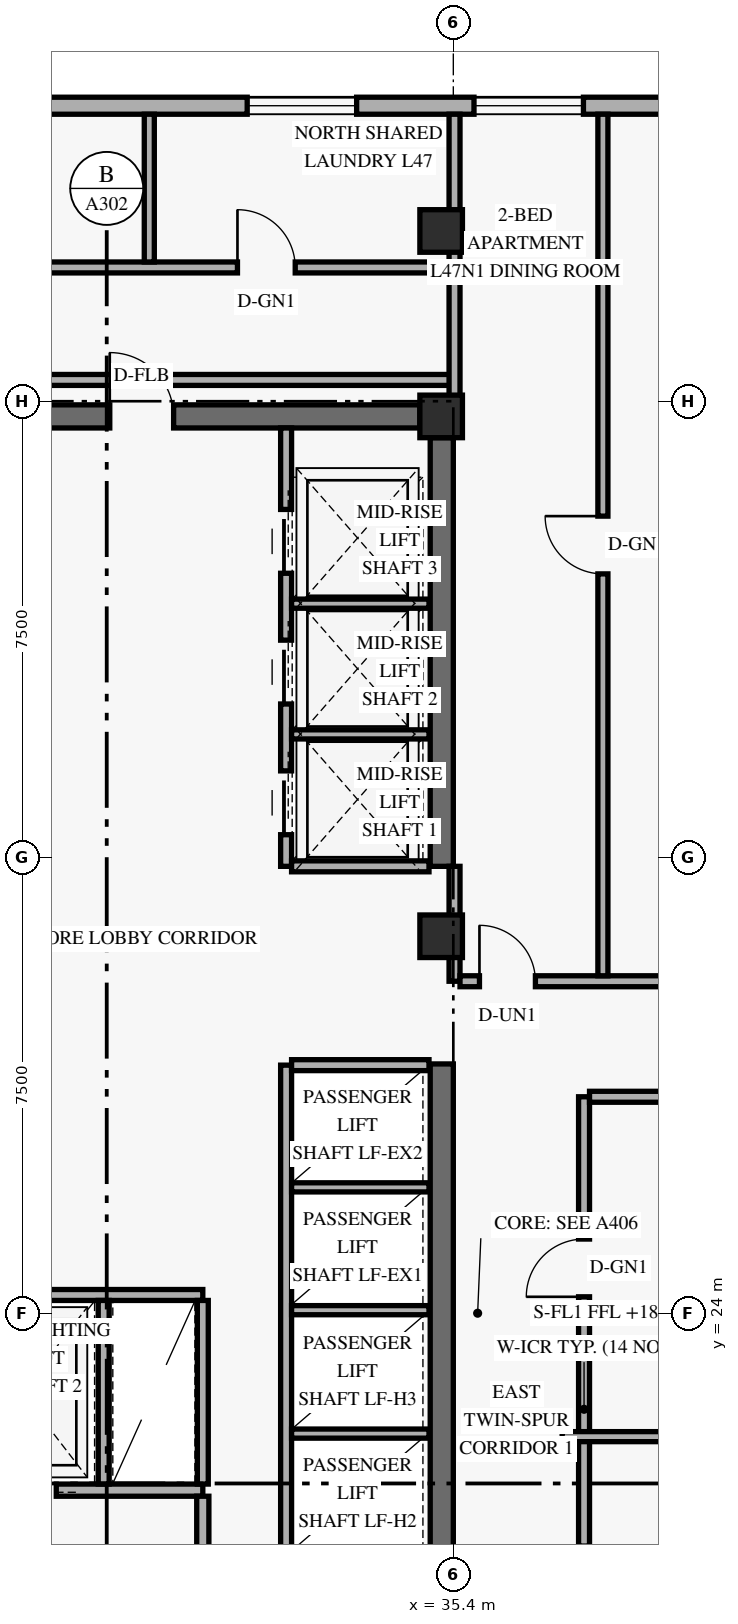
"""IFC4 building model, lengths in metres.
Left out: names, types, materials, properties, quantities, classifications, styles, units other than length and angle.
Written with IfcOpenShell. Run it as: python <this file> out.ifc"""

import sys

from ifc_helpers import new_model, si_unit, direction, frame, frame_2d, origin, origin_2d, place, context, subcontext, project, spatial, rectangle, extrude, element, fill, save


model = new_model("IFC4")
c1 = context("Model", 3, precision=1e-05, world=origin(), true_north=direction((0.0, 1.0)))
c2 = subcontext(c1, "Body", "Model", "MODEL_VIEW")
j1 = project(units=[si_unit("LENGTHUNIT", "METRE"), si_unit("PLANEANGLEUNIT", "RADIAN")], contexts=[c1])
p1 = place(None, origin())
s1 = spatial("IfcSite", under=j1, at=p1, CompositionType="ELEMENT")
p2 = place(p1, origin())
s2 = spatial("IfcBuilding", under=s1, at=p2, CompositionType="ELEMENT")
p3 = place(p2, frame((0.0, 0.0, 181.2)))
s3 = spatial("IfcBuildingStorey", under=s2, at=p3, CompositionType="ELEMENT", Elevation=181.2)
p4 = place(p3, frame((35.21, 17.9, 0.0), z_axis=(0.0, 0.0, 1.0), x_axis=(0.0, 1.0, 0.0)))
e1 = element("IfcWall", 1, at=p4, inside=s3, PredefinedType="SHEAR", context=c2, shape_type="SweptSolid", body=[
    extrude(rectangle(XDim=10.2, YDim=0.38, at=frame_2d((5.1, 0.0))), origin(), (0.0, 0.0, 1.0), 2.748),
])
p5 = place(p3, frame((35.21, 31.35, 0.0), z_axis=(0.0, 0.0, 1.0), x_axis=(0.0, 1.0, 0.0)))
e2 = element("IfcWall", 2, at=p5, inside=s3, PredefinedType="SHEAR", context=c2, shape_type="SweptSolid", body=[
    extrude(rectangle(XDim=7.05, YDim=0.38, at=frame_2d((3.525, 0.0))), origin(), (0.0, 0.0, 1.0), 2.748),
])
p6 = place(p3, frame((24.55, 38.75, 0.0), z_axis=(0.0, 0.0, 1.0), x_axis=(1.0, 0.0, 0.0)))
e3 = element("IfcWall", 3, at=p6, inside=s3, PredefinedType="SHEAR", context=c2, shape_type="SweptSolid", body=[
    extrude(rectangle(XDim=10.3, YDim=0.38, at=frame_2d((5.15, 0.0))), origin(), (0.0, 0.0, 1.0), 3.36),
])
p7 = place(p6, frame((5.2, 0.0, 0.0)))
e4 = element("IfcOpeningElement", 4, at=p7, cuts=e3, PredefinedType="OPENING", context=c2, shape_type="SweptSolid", body=[
    extrude(rectangle(XDim=1.05, YDim=2.15, at=frame_2d((0.525, 1.075))), frame((0.0, 0.2, 0.0), z_axis=(0.0, -1.0, 0.0), x_axis=(1.0, 0.0, 0.0)), (0.0, 0.0, 1.0), 0.4),
])
for number, where, z_axis, x_axis in (
    (5, (35.2, 30.2, 0.0), (0.0, 0.0, 1.0), (1.0, 0.0, 0.0)),
    (6, (35.2, 38.75, 0.0), (0.0, 0.0, 1.0), (1.0, 0.0, 0.0)),
    (7, (35.2, 41.8, 0.0), (0.0, 0.0, 1.0), (1.0, 0.0, 0.0)),
):
    element("IfcColumn", number, at=place(p3, frame(where, z_axis=z_axis, x_axis=x_axis)), inside=s3, PredefinedType="COLUMN", context=c2, shape_type="SweptSolid", body=[
        extrude(rectangle(XDim=0.7, YDim=0.7, at=origin_2d()), origin(), (0.0, 0.0, 1.0), 3.6),
    ])
p8 = place(p3, frame((54.98, 43.86, 0.0), z_axis=(0.0, 0.0, 1.0), x_axis=(-1.0, 0.0, 0.0)))
e8 = element("IfcWall", 8, at=p8, inside=s3, PredefinedType="SOLIDWALL", context=c2, shape_type="SweptSolid", body=[
    extrude(rectangle(XDim=33.76, YDim=0.28, at=frame_2d((16.88, 0.0))), origin(), (0.0, 0.0, 1.0), 3.36),
])
p9 = place(p8, frame((28.055, 0.0, 0.85)))
e9 = element("IfcOpeningElement", 9, at=p9, cuts=e8, PredefinedType="OPENING", context=c2, shape_type="SweptSolid", body=[
    extrude(rectangle(XDim=1.8, YDim=1.6, at=frame_2d((0.9, 0.8))), frame((0.0, 0.15, 0.0), z_axis=(0.0, -1.0, 0.0), x_axis=(1.0, 0.0, 0.0)), (0.0, 0.0, 1.0), 0.3),
])
p10 = place(p8, frame((21.17, 0.0, 0.85)))
e10 = element("IfcOpeningElement", 10, at=p10, cuts=e8, PredefinedType="OPENING", context=c2, shape_type="SweptSolid", body=[
    extrude(rectangle(XDim=1.8, YDim=1.6, at=frame_2d((0.9, 0.8))), frame((0.0, 0.15, 0.0), z_axis=(0.0, -1.0, 0.0), x_axis=(1.0, 0.0, 0.0)), (0.0, 0.0, 1.0), 0.3),
])
p11 = place(p8, frame((17.44, 0.0, 0.85)))
e11 = element("IfcOpeningElement", 11, at=p11, cuts=e8, PredefinedType="OPENING", context=c2, shape_type="SweptSolid", body=[
    extrude(rectangle(XDim=1.8, YDim=1.6, at=frame_2d((0.9, 0.8))), frame((0.0, 0.15, 0.0), z_axis=(0.0, -1.0, 0.0), x_axis=(1.0, 0.0, 0.0)), (0.0, 0.0, 1.0), 0.3),
])
p12 = place(p8, frame((13.32, 0.0, 0.85)))
e12 = element("IfcOpeningElement", 12, at=p12, cuts=e8, PredefinedType="OPENING", context=c2, shape_type="SweptSolid", body=[
    extrude(rectangle(XDim=1.8, YDim=1.6, at=frame_2d((0.9, 0.8))), frame((0.0, 0.15, 0.0), z_axis=(0.0, -1.0, 0.0), x_axis=(1.0, 0.0, 0.0)), (0.0, 0.0, 1.0), 0.3),
])
p13 = place(p8, frame((8.35, 0.0, 0.85)))
e13 = element("IfcOpeningElement", 13, at=p13, cuts=e8, PredefinedType="OPENING", context=c2, shape_type="SweptSolid", body=[
    extrude(rectangle(XDim=1.8, YDim=1.6, at=frame_2d((0.9, 0.8))), frame((0.0, 0.15, 0.0), z_axis=(0.0, -1.0, 0.0), x_axis=(1.0, 0.0, 0.0)), (0.0, 0.0, 1.0), 0.3),
])
p14 = place(p8, frame((5.68, 0.0, 0.85)))
e14 = element("IfcOpeningElement", 14, at=p14, cuts=e8, PredefinedType="OPENING", context=c2, shape_type="SweptSolid", body=[
    extrude(rectangle(XDim=1.2, YDim=1.5, at=frame_2d((0.6, 0.75))), frame((0.0, 0.15, 0.0), z_axis=(0.0, -1.0, 0.0), x_axis=(1.0, 0.0, 0.0)), (0.0, 0.0, 1.0), 0.3),
])
p15 = place(p8, frame((1.79, 0.0, 0.85)))
e15 = element("IfcOpeningElement", 15, at=p15, cuts=e8, PredefinedType="OPENING", context=c2, shape_type="SweptSolid", body=[
    extrude(rectangle(XDim=1.8, YDim=1.6, at=frame_2d((0.9, 0.8))), frame((0.0, 0.15, 0.0), z_axis=(0.0, -1.0, 0.0), x_axis=(1.0, 0.0, 0.0)), (0.0, 0.0, 1.0), 0.3),
])
p16 = place(p3, frame((24.45, 21.09, 0.0), z_axis=(0.0, 0.0, 1.0), x_axis=(1.0, 0.0, 0.0)))
e16 = element("IfcWall", 16, at=p16, inside=s3, PredefinedType="STANDARD", context=c2, shape_type="SweptSolid", body=[
    extrude(rectangle(XDim=6.83, YDim=0.2, at=frame_2d((3.415, 0.0))), origin(), (0.0, 0.0, 1.0), 3.36),
])
p17 = place(p16, frame((0.72, 0.0, 0.0)))
e17 = element("IfcOpeningElement", 17, at=p17, cuts=e16, PredefinedType="OPENING", context=c2, shape_type="SweptSolid", body=[
    extrude(rectangle(XDim=1.1, YDim=2.2, at=frame_2d((0.55, 1.1))), frame((0.0, 0.11, 0.0), z_axis=(0.0, -1.0, 0.0), x_axis=(1.0, 0.0, 0.0)), (0.0, 0.0, 1.0), 0.22),
])
p18 = place(p16, frame((3.32, 0.0, 0.0)))
e18 = element("IfcOpeningElement", 18, at=p18, cuts=e16, PredefinedType="OPENING", context=c2, shape_type="SweptSolid", body=[
    extrude(rectangle(XDim=1.1, YDim=2.2, at=frame_2d((0.55, 1.1))), frame((0.0, 0.11, 0.0), z_axis=(0.0, -1.0, 0.0), x_axis=(1.0, 0.0, 0.0)), (0.0, 0.0, 1.0), 0.22),
])
p19 = place(p3, frame((31.28, 17.07, 0.0), z_axis=(0.0, 0.0, 1.0), x_axis=(0.0, 1.0, 0.0)))
e19 = element("IfcWall", 19, at=p19, inside=s3, PredefinedType="STANDARD", context=c2, shape_type="SweptSolid", body=[
    extrude(rectangle(XDim=3.92, YDim=0.2, at=frame_2d((1.96, 0.0))), origin(), (0.0, 0.0, 1.0), 2.73),
])
p20 = place(p19, frame((1.35, 0.0, 0.0)))
e20 = element("IfcOpeningElement", 20, at=p20, cuts=e19, PredefinedType="OPENING", context=c2, shape_type="SweptSolid", body=[
    extrude(rectangle(XDim=1.2, YDim=2.15, at=frame_2d((0.6, 1.075))), frame((0.0, 0.11, 0.0), z_axis=(0.0, -1.0, 0.0), x_axis=(1.0, 0.0, 0.0)), (0.0, 0.0, 1.0), 0.22),
])
p21 = place(p3, frame((24.45, 24.3, 0.0), z_axis=(0.0, 0.0, 1.0), x_axis=(1.0, 0.0, 0.0)))
e21 = element("IfcWall", 21, at=p21, inside=s3, PredefinedType="STANDARD", context=c2, shape_type="SweptSolid", body=[
    extrude(rectangle(XDim=6.83, YDim=0.18, at=frame_2d((3.415, 0.0))), origin(), (0.0, 0.0, 1.0), 3.36),
])
for number, where, z_axis, x_axis in (
    (22, (29.65, 21.19, 0.0), (0.0, 0.0, 1.0), (0.0, 1.0, 0.0)),
    (23, (31.28, 21.19, 0.0), (0.0, 0.0, 1.0), (0.0, 1.0, 0.0)),
):
    element("IfcWall", number, at=place(p3, frame(where, z_axis=z_axis, x_axis=x_axis)), inside=s3, PredefinedType="STANDARD", context=c2, shape_type="SweptSolid", body=[
        extrude(rectangle(XDim=3.02, YDim=0.18, at=frame_2d((1.51, 0.0))), origin(), (0.0, 0.0, 1.0), 3.36),
    ])
p22 = place(p3, frame((32.65, 18.02, 0.0), z_axis=(0.0, 0.0, 1.0), x_axis=(0.0, 1.0, 0.0)))
e24 = element("IfcWall", 24, at=p22, inside=s3, PredefinedType="STANDARD", context=c2, shape_type="SweptSolid", body=[
    extrude(rectangle(XDim=10.06, YDim=0.18, at=frame_2d((5.03, 0.0))), origin(), (0.0, 0.0, 1.0), 3.36),
])
p23 = place(p3, frame((32.74, 28.08, 0.0), z_axis=(0.0, 0.0, 1.0), x_axis=(1.0, 0.0, 0.0)))
e25 = element("IfcWall", 25, at=p23, inside=s3, PredefinedType="STANDARD", context=c2, shape_type="SweptSolid", body=[
    extrude(rectangle(XDim=2.26, YDim=0.18, at=frame_2d((1.13, 0.0))), origin(), (0.0, 0.0, 1.0), 3.36),
])
for number, where, z_axis, x_axis in (
    (26, (32.74, 22.02, 0.0), (0.0, 0.0, 1.0), (1.0, 0.0, 0.0)),
    (27, (32.74, 24.05, 0.0), (0.0, 0.0, 1.0), (1.0, 0.0, 0.0)),
    (28, (32.74, 26.07, 0.0), (0.0, 0.0, 1.0), (1.0, 0.0, 0.0)),
):
    element("IfcWall", number, at=place(p3, frame(where, z_axis=z_axis, x_axis=x_axis)), inside=s3, PredefinedType="STANDARD", context=c2, shape_type="SweptSolid", body=[
        extrude(rectangle(XDim=2.26, YDim=0.15, at=frame_2d((1.13, 0.0))), origin(), (0.0, 0.0, 1.0), 3.36),
    ])
p24 = place(p3, frame((32.65, 31.35, 0.0), z_axis=(0.0, 0.0, 1.0), x_axis=(0.0, 1.0, 0.0)))
e29 = element("IfcWall", 29, at=p24, inside=s3, PredefinedType="STANDARD", context=c2, shape_type="SweptSolid", body=[
    extrude(rectangle(XDim=7.21, YDim=0.18, at=frame_2d((3.605, 0.0))), origin(), (0.0, 0.0, 1.0), 3.36),
])
p25 = place(p24, frame((0.52, 0.0, 0.0)))
e30 = element("IfcOpeningElement", 30, at=p25, cuts=e29, PredefinedType="OPENING", context=c2, shape_type="SweptSolid", body=[
    extrude(rectangle(XDim=1.05, YDim=2.2, at=frame_2d((0.525, 1.1))), frame((0.0, 0.1, 0.0), z_axis=(0.0, -1.0, 0.0), x_axis=(1.0, 0.0, 0.0)), (0.0, 0.0, 1.0), 0.2),
])
p26 = place(p24, frame((2.67, 0.0, 0.0)))
e31 = element("IfcOpeningElement", 31, at=p26, cuts=e29, PredefinedType="OPENING", context=c2, shape_type="SweptSolid", body=[
    extrude(rectangle(XDim=1.05, YDim=2.2, at=frame_2d((0.525, 1.1))), frame((0.0, 0.1, 0.0), z_axis=(0.0, -1.0, 0.0), x_axis=(1.0, 0.0, 0.0)), (0.0, 0.0, 1.0), 0.2),
])
p27 = place(p24, frame((4.82, 0.0, 0.0)))
e32 = element("IfcOpeningElement", 32, at=p27, cuts=e29, PredefinedType="OPENING", context=c2, shape_type="SweptSolid", body=[
    extrude(rectangle(XDim=1.05, YDim=2.2, at=frame_2d((0.525, 1.1))), frame((0.0, 0.1, 0.0), z_axis=(0.0, -1.0, 0.0), x_axis=(1.0, 0.0, 0.0)), (0.0, 0.0, 1.0), 0.2),
])
p28 = place(p3, frame((32.74, 31.35, 0.0), z_axis=(0.0, 0.0, 1.0), x_axis=(1.0, 0.0, 0.0)))
e33 = element("IfcWall", 33, at=p28, inside=s3, PredefinedType="STANDARD", context=c2, shape_type="SweptSolid", body=[
    extrude(rectangle(XDim=2.26, YDim=0.18, at=frame_2d((1.13, 0.0))), origin(), (0.0, 0.0, 1.0), 3.36),
])
for number, where, z_axis, x_axis in (
    (34, (32.74, 33.52, 0.0), (0.0, 0.0, 1.0), (1.0, 0.0, 0.0)),
    (35, (32.74, 35.67, 0.0), (0.0, 0.0, 1.0), (1.0, 0.0, 0.0)),
):
    element("IfcWall", number, at=place(p3, frame(where, z_axis=z_axis, x_axis=x_axis)), inside=s3, PredefinedType="STANDARD", context=c2, shape_type="SweptSolid", body=[
        extrude(rectangle(XDim=2.26, YDim=0.15, at=frame_2d((1.13, 0.0))), origin(), (0.0, 0.0, 1.0), 3.36),
    ])
p29 = place(p3, frame((37.55, 17.28, 0.0), z_axis=(0.0, 0.0, 1.0), x_axis=(0.0, 1.0, 0.0)))
e36 = element("IfcWall", 36, at=p29, inside=s3, PredefinedType="STANDARD", context=c2, shape_type="SweptSolid", body=[
    extrude(rectangle(XDim=10.28, YDim=0.18, at=frame_2d((5.14, 0.0))), origin(), (0.0, 0.0, 1.0), 2.73),
])
p30 = place(p29, frame((1.94, 0.0, 0.0)))
e37 = element("IfcOpeningElement", 37, at=p30, cuts=e36, PredefinedType="OPENING", context=c2, shape_type="SweptSolid", body=[
    extrude(rectangle(XDim=0.95, YDim=2.15, at=frame_2d((0.475, 1.075))), frame((0.0, 0.1, 0.0), z_axis=(0.0, -1.0, 0.0), x_axis=(1.0, 0.0, 0.0)), (0.0, 0.0, 1.0), 0.2),
])
p31 = place(p29, frame((6.99, 0.0, 0.0)))
e38 = element("IfcOpeningElement", 38, at=p31, cuts=e36, PredefinedType="OPENING", context=c2, shape_type="SweptSolid", body=[
    extrude(rectangle(XDim=0.95, YDim=2.15, at=frame_2d((0.475, 1.075))), frame((0.0, 0.1, 0.0), z_axis=(0.0, -1.0, 0.0), x_axis=(1.0, 0.0, 0.0)), (0.0, 0.0, 1.0), 0.2),
])
p32 = place(p3, frame((37.64, 27.56, 0.0), z_axis=(0.0, 0.0, 1.0), x_axis=(1.0, 0.0, 0.0)))
e39 = element("IfcWall", 39, at=p32, inside=s3, PredefinedType="STANDARD", context=c2, shape_type="SweptSolid", body=[
    extrude(rectangle(XDim=10.16, YDim=0.18, at=frame_2d((5.08, 0.0))), origin(), (0.0, 0.0, 1.0), 2.73),
])
p33 = place(p3, frame((35.42, 29.46, 0.0), z_axis=(0.0, 0.0, 1.0), x_axis=(0.0, 1.0, 0.0)))
e40 = element("IfcWall", 40, at=p33, inside=s3, PredefinedType="STANDARD", context=c2, shape_type="SweptSolid", body=[
    extrude(rectangle(XDim=1.89, YDim=0.18, at=frame_2d((0.945, 0.0))), origin(), (0.0, 0.0, 1.0), 2.73),
])
p34 = place(p3, frame((35.51, 29.46, 0.0), z_axis=(0.0, 0.0, 1.0), x_axis=(1.0, 0.0, 0.0)))
e41 = element("IfcWall", 41, at=p34, inside=s3, PredefinedType="STANDARD", context=c2, shape_type="SweptSolid", body=[
    extrude(rectangle(XDim=12.29, YDim=0.18, at=frame_2d((6.145, 0.0))), origin(), (0.0, 0.0, 1.0), 2.73),
])
p35 = place(p34, frame((0.32, 0.0, 0.0)))
e42 = element("IfcOpeningElement", 42, at=p35, cuts=e41, PredefinedType="OPENING", context=c2, shape_type="SweptSolid", body=[
    extrude(rectangle(XDim=0.92, YDim=2.15, at=frame_2d((0.46, 1.075))), frame((0.0, 0.1, 0.0), z_axis=(0.0, -1.0, 0.0), x_axis=(1.0, 0.0, 0.0)), (0.0, 0.0, 1.0), 0.2),
])
p36 = place(p3, frame((21.74, 41.2, 0.0), z_axis=(0.0, 0.0, 1.0), x_axis=(1.0, 0.0, 0.0)))
e43 = element("IfcWall", 43, at=p36, inside=s3, PredefinedType="STANDARD", context=c2, shape_type="SweptSolid", body=[
    extrude(rectangle(XDim=13.68, YDim=0.18, at=frame_2d((6.84, 0.0))), origin(), (0.0, 0.0, 1.0), 2.73),
])
p37 = place(p36, frame((2.95, 0.0, 0.0)))
e44 = element("IfcOpeningElement", 44, at=p37, cuts=e43, PredefinedType="OPENING", context=c2, shape_type="SweptSolid", body=[
    extrude(rectangle(XDim=0.95, YDim=2.15, at=frame_2d((0.475, 1.075))), frame((0.0, 0.1, 0.0), z_axis=(0.0, -1.0, 0.0), x_axis=(1.0, 0.0, 0.0)), (0.0, 0.0, 1.0), 0.2),
])
p38 = place(p36, frame((10.11, 0.0, 0.0)))
e45 = element("IfcOpeningElement", 45, at=p38, cuts=e43, PredefinedType="OPENING", context=c2, shape_type="SweptSolid", body=[
    extrude(rectangle(XDim=0.95, YDim=2.15, at=frame_2d((0.475, 1.075))), frame((0.0, 0.1, 0.0), z_axis=(0.0, -1.0, 0.0), x_axis=(1.0, 0.0, 0.0)), (0.0, 0.0, 1.0), 0.2),
])
p39 = place(p3, frame((23.85, 39.35, 0.0), z_axis=(0.0, 0.0, 1.0), x_axis=(1.0, 0.0, 0.0)))
e46 = element("IfcWall", 46, at=p39, inside=s3, PredefinedType="STANDARD", context=c2, shape_type="SweptSolid", body=[
    extrude(rectangle(XDim=11.57, YDim=0.18, at=frame_2d((5.785, 0.0))), origin(), (0.0, 0.0, 1.0), 2.73),
])
p40 = place(p3, frame((35.42, 38.75, 0.0), z_axis=(0.0, 0.0, 1.0), x_axis=(0.0, 1.0, 0.0)))
e47 = element("IfcWall", 47, at=p40, inside=s3, PredefinedType="PARTITIONING", context=c2, shape_type="SweptSolid", body=[
    extrude(rectangle(XDim=4.97, YDim=0.18, at=frame_2d((2.485, 0.0))), origin(), (0.0, 0.0, 1.0), 2.73),
])
p41 = place(p3, frame((37.86, 29.55, 0.0), z_axis=(0.0, 0.0, 1.0), x_axis=(0.0, 1.0, 0.0)))
e48 = element("IfcWall", 48, at=p41, inside=s3, PredefinedType="PARTITIONING", context=c2, shape_type="SweptSolid", body=[
    extrude(rectangle(XDim=14.17, YDim=0.165, at=frame_2d((7.085, 0.0))), origin(), (0.0, 0.0, 1.0), 2.73),
])
p42 = place(p41, frame((6.61, 0.0, 0.0)))
e49 = element("IfcOpeningElement", 49, at=p42, cuts=e48, PredefinedType="OPENING", context=c2, shape_type="SweptSolid", body=[
    extrude(rectangle(XDim=0.95, YDim=2.15, at=frame_2d((0.475, 1.075))), frame((0.0, 0.093, 0.0), z_axis=(0.0, -1.0, 0.0), x_axis=(1.0, 0.0, 0.0)), (0.0, 0.0, 1.0), 0.185),
])
p43 = place(p3, frame((37.19, 21.97, 0.0), z_axis=(0.0, 0.0, 1.0), x_axis=(1.0, 0.0, 0.0)))
e50 = element("IfcWall", 50, at=p43, inside=s3, PredefinedType="PARTITIONING", context=c2, shape_type="SweptSolid", body=[
    extrude(rectangle(XDim=5.845, YDim=0.165, at=frame_2d((2.922, 0.0))), origin(), (0.0, 0.0, 1.0), 3.36),
])
p44 = place(p3, frame((30.4, 41.29, 0.0), z_axis=(0.0, 0.0, 1.0), x_axis=(0.0, 1.0, 0.0)))
e51 = element("IfcWall", 51, at=p44, inside=s3, PredefinedType="PARTITIONING", context=c2, shape_type="SweptSolid", body=[
    extrude(rectangle(XDim=2.43, YDim=0.165, at=frame_2d((1.215, 0.0))), origin(), (0.0, 0.0, 1.0), 2.879),
])
p45 = place(p10, origin())
e52 = element("IfcWindow", 52, at=p45, inside=s3, PartitioningType="SINGLE_PANEL", PredefinedType="WINDOW", context=c2, shape_type="SweptSolid", body=[
    extrude(rectangle(XDim=1.8, YDim=1.6, at=frame_2d((0.9, 0.8))), frame((0.0, 0.03, 0.0), z_axis=(0.0, -1.0, 0.0), x_axis=(1.0, 0.0, 0.0)), (0.0, 0.0, 1.0), 0.06),
])
fill(e10, e52)
p46 = place(p11, origin())
e53 = element("IfcWindow", 53, at=p46, inside=s3, PartitioningType="SINGLE_PANEL", PredefinedType="WINDOW", context=c2, shape_type="SweptSolid", body=[
    extrude(rectangle(XDim=1.8, YDim=1.6, at=frame_2d((0.9, 0.8))), frame((0.0, 0.03, 0.0), z_axis=(0.0, -1.0, 0.0), x_axis=(1.0, 0.0, 0.0)), (0.0, 0.0, 1.0), 0.06),
])
fill(e11, e53)
p47 = place(p18, origin())
e54 = element("IfcDoor", 54, at=p47, inside=s3, OperationType="SLIDING_TO_LEFT", PredefinedType="DOOR", context=c2, shape_type="SweptSolid", body=[
    extrude(rectangle(XDim=1.1, YDim=2.2, at=frame_2d((0.55, 1.1))), frame((0.0, 0.025, 0.0), z_axis=(0.0, -1.0, 0.0), x_axis=(1.0, 0.0, 0.0)), (0.0, 0.0, 1.0), 0.05),
])
fill(e18, e54)
p48 = place(p25, origin())
e55 = element("IfcDoor", 55, at=p48, inside=s3, OperationType="SLIDING_TO_LEFT", PredefinedType="DOOR", context=c2, shape_type="SweptSolid", body=[
    extrude(rectangle(XDim=1.05, YDim=2.2, at=frame_2d((0.525, 1.1))), frame((0.0, 0.025, 0.0), z_axis=(0.0, -1.0, 0.0), x_axis=(1.0, 0.0, 0.0)), (0.0, 0.0, 1.0), 0.05),
])
fill(e30, e55)
p49 = place(p26, origin())
e56 = element("IfcDoor", 56, at=p49, inside=s3, OperationType="SLIDING_TO_LEFT", PredefinedType="DOOR", context=c2, shape_type="SweptSolid", body=[
    extrude(rectangle(XDim=1.05, YDim=2.2, at=frame_2d((0.525, 1.1))), frame((0.0, 0.025, 0.0), z_axis=(0.0, -1.0, 0.0), x_axis=(1.0, 0.0, 0.0)), (0.0, 0.0, 1.0), 0.05),
])
fill(e31, e56)
p50 = place(p27, origin())
e57 = element("IfcDoor", 57, at=p50, inside=s3, OperationType="SLIDING_TO_LEFT", PredefinedType="DOOR", context=c2, shape_type="SweptSolid", body=[
    extrude(rectangle(XDim=1.05, YDim=2.2, at=frame_2d((0.525, 1.1))), frame((0.0, 0.025, 0.0), z_axis=(0.0, -1.0, 0.0), x_axis=(1.0, 0.0, 0.0)), (0.0, 0.0, 1.0), 0.05),
])
fill(e32, e57)
p51 = place(p7, frame((1.05, 0.0, 0.0), z_axis=(0.0, 0.0, 1.0), x_axis=(-1.0, 0.0, 0.0)))
e58 = element("IfcDoor", 58, at=p51, inside=s3, OperationType="SINGLE_SWING_RIGHT", PredefinedType="DOOR", context=c2, shape_type="SweptSolid", body=[
    extrude(rectangle(XDim=1.05, YDim=2.15, at=frame_2d((0.525, 1.075))), frame((0.0, 0.025, 0.0), z_axis=(0.0, -1.0, 0.0), x_axis=(1.0, 0.0, 0.0)), (0.0, 0.0, 1.0), 0.05),
])
fill(e4, e58)
p52 = place(p42, origin())
e59 = element("IfcDoor", 59, at=p52, inside=s3, OperationType="SINGLE_SWING_RIGHT", PredefinedType="DOOR", context=c2, shape_type="SweptSolid", body=[
    extrude(rectangle(XDim=0.95, YDim=2.15, at=frame_2d((0.475, 1.075))), frame((0.0, 0.025, 0.0), z_axis=(0.0, -1.0, 0.0), x_axis=(1.0, 0.0, 0.0)), (0.0, 0.0, 1.0), 0.05),
])
fill(e49, e59)
p53 = place(p35, origin())
e60 = element("IfcDoor", 60, at=p53, inside=s3, OperationType="SINGLE_SWING_LEFT", PredefinedType="DOOR", context=c2, shape_type="SweptSolid", body=[
    extrude(rectangle(XDim=0.92, YDim=2.15, at=frame_2d((0.46, 1.075))), frame((0.0, 0.025, 0.0), z_axis=(0.0, -1.0, 0.0), x_axis=(1.0, 0.0, 0.0)), (0.0, 0.0, 1.0), 0.05),
])
fill(e42, e60)
p54 = place(p31, origin())
e61 = element("IfcDoor", 61, at=p54, inside=s3, OperationType="SINGLE_SWING_LEFT", PredefinedType="DOOR", context=c2, shape_type="SweptSolid", body=[
    extrude(rectangle(XDim=0.95, YDim=2.15, at=frame_2d((0.475, 1.075))), frame((0.0, 0.025, 0.0), z_axis=(0.0, -1.0, 0.0), x_axis=(1.0, 0.0, 0.0)), (0.0, 0.0, 1.0), 0.05),
])
fill(e38, e61)
p55 = place(p38, origin())
e62 = element("IfcDoor", 62, at=p55, inside=s3, OperationType="SINGLE_SWING_LEFT", PredefinedType="DOOR", context=c2, shape_type="SweptSolid", body=[
    extrude(rectangle(XDim=0.95, YDim=2.15, at=frame_2d((0.475, 1.075))), frame((0.0, 0.025, 0.0), z_axis=(0.0, -1.0, 0.0), x_axis=(1.0, 0.0, 0.0)), (0.0, 0.0, 1.0), 0.05),
])
fill(e45, e62)
save(model, sys.argv[1])
